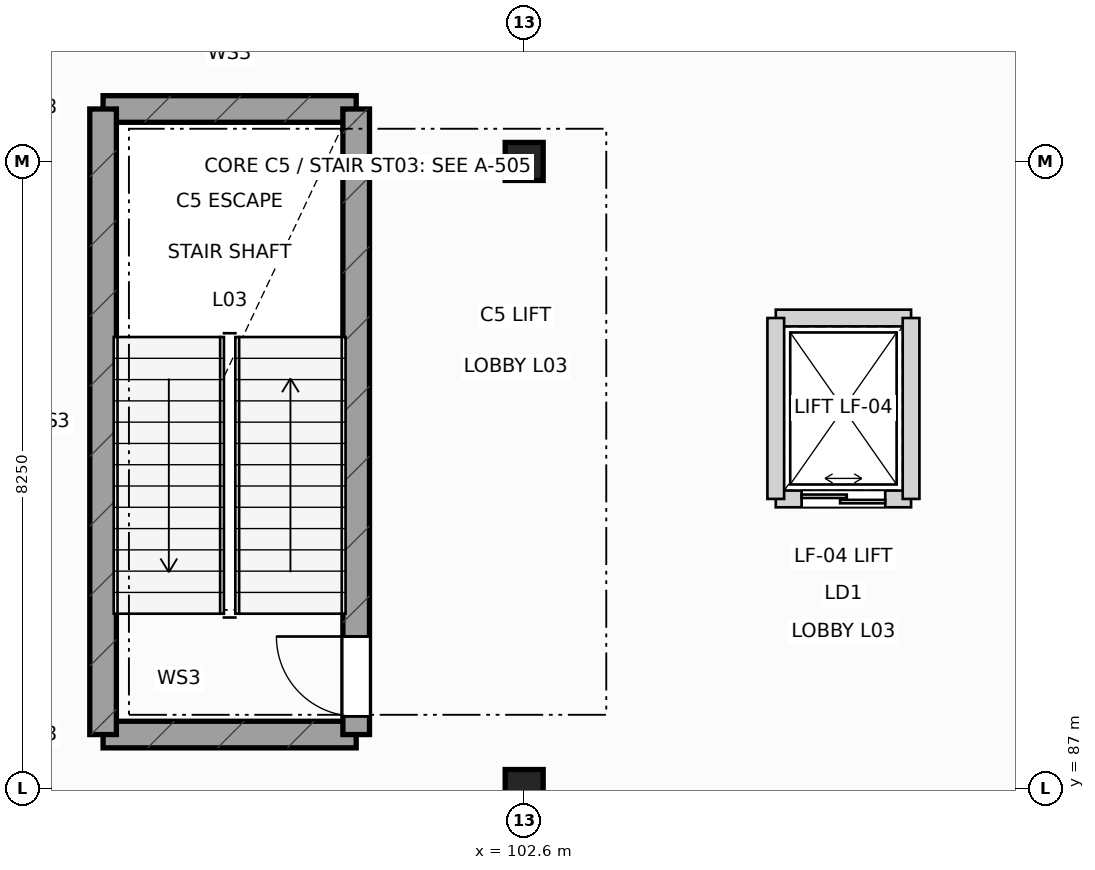
"""IFC4 building model, lengths in metres.
Left out: names, types, materials, properties, quantities, classifications, styles, units other than length and angle.
Written with IfcOpenShell. Run it as: python <this file> out.ifc"""

import sys

from ifc_helpers import new_model, si_unit, direction, frame, frame_2d, origin, origin_2d, place, context, subcontext, project, spatial, rectangle, extrude, element, fill, save


model = new_model("IFC4")
c1 = context("Model", 3, precision=1e-05, world=origin(), true_north=direction((0.0, 1.0)))
c2 = subcontext(c1, "Body", "Model", "MODEL_VIEW")
j1 = project(units=[si_unit("LENGTHUNIT", "METRE"), si_unit("PLANEANGLEUNIT", "RADIAN")], contexts=[c1])
p1 = place(None, origin())
s1 = spatial("IfcSite", under=j1, at=p1, CompositionType="ELEMENT")
p2 = place(p1, origin())
s2 = spatial("IfcBuilding", under=s1, at=p2, CompositionType="ELEMENT")
p3 = place(p2, frame((0.0, 0.0, 16.8)))
s3 = spatial("IfcBuildingStorey", under=s2, at=p3, CompositionType="ELEMENT", Elevation=16.8)
for number, where, z_axis, x_axis in (
    (1, (102.6, 87.0, 0.0), (0.0, 0.0, 1.0), (1.0, 0.0, 0.0)),
    (2, (102.6, 95.25, 0.0), (0.0, 0.0, 1.0), (1.0, 0.0, 0.0)),
):
    element("IfcColumn", number, at=place(p3, frame(where, z_axis=z_axis, x_axis=x_axis)), inside=s3, PredefinedType="COLUMN", context=c2, shape_type="SweptSolid", body=[
        extrude(rectangle(XDim=0.5, YDim=0.5, at=origin_2d()), origin(), (0.0, 0.0, 1.0), 4.8),
    ])
for number, where, z_axis, x_axis in (
    (3, (97.06, 87.71, 0.0), (0.0, 0.0, 1.0), (1.0, 0.0, 0.0)),
    (4, (97.06, 95.94, 0.0), (0.0, 0.0, 1.0), (1.0, 0.0, 0.0)),
):
    element("IfcWall", number, at=place(p3, frame(where, z_axis=z_axis, x_axis=x_axis)), inside=s3, PredefinedType="SHEAR", context=c2, shape_type="SweptSolid", body=[
        extrude(rectangle(XDim=3.33, YDim=0.35, at=frame_2d((1.665, 0.0))), origin(), (0.0, 0.0, 1.0), 4.52),
    ])
p4 = place(p3, frame((97.06, 87.71, 0.0), z_axis=(0.0, 0.0, 1.0), x_axis=(0.0, 1.0, 0.0)))
e5 = element("IfcWall", 5, at=p4, inside=s3, PredefinedType="SHEAR", context=c2, shape_type="SweptSolid", body=[
    extrude(rectangle(XDim=8.23, YDim=0.35, at=frame_2d((4.115, 0.0))), origin(), (0.0, 0.0, 1.0), 4.52),
])
p5 = place(p3, frame((100.39, 87.71, 0.0), z_axis=(0.0, 0.0, 1.0), x_axis=(0.0, 1.0, 0.0)))
e6 = element("IfcWall", 6, at=p5, inside=s3, PredefinedType="SHEAR", context=c2, shape_type="SweptSolid", body=[
    extrude(rectangle(XDim=8.23, YDim=0.35, at=frame_2d((4.115, 0.0))), origin(), (0.0, 0.0, 1.0), 4.52),
])
p6 = place(p5, frame((0.24, 0.0, 0.0)))
e7 = element("IfcOpeningElement", 7, at=p6, cuts=e6, PredefinedType="OPENING", context=c2, shape_type="SweptSolid", body=[
    extrude(rectangle(XDim=1.05, YDim=2.18, at=frame_2d((0.525, 1.09))), frame((0.0, 0.185, 0.0), z_axis=(0.0, -1.0, 0.0), x_axis=(1.0, 0.0, 0.0)), (0.0, 0.0, 1.0), 0.37),
])
p7 = place(p3, frame((105.91, 90.81, 0.0), z_axis=(0.0, 0.0, 1.0), x_axis=(1.0, 0.0, 0.0)))
e8 = element("IfcWall", 8, at=p7, inside=s3, PredefinedType="PARTITIONING", context=c2, shape_type="SweptSolid", body=[
    extrude(rectangle(XDim=1.78, YDim=0.22, at=frame_2d((0.89, 0.0))), origin(), (0.0, 0.0, 1.0), 4.485),
])
p8 = place(p7, frame((0.34, 0.0, 0.0)))
e9 = element("IfcOpeningElement", 9, at=p8, cuts=e8, PredefinedType="OPENING", context=c2, shape_type="SweptSolid", body=[
    extrude(rectangle(XDim=1.1, YDim=2.18, at=frame_2d((0.55, 1.09))), frame((0.0, 0.12, 0.0), z_axis=(0.0, -1.0, 0.0), x_axis=(1.0, 0.0, 0.0)), (0.0, 0.0, 1.0), 0.24),
])
p9 = place(p3, frame((105.91, 93.19, 0.0), z_axis=(0.0, 0.0, 1.0), x_axis=(1.0, 0.0, 0.0)))
e10 = element("IfcWall", 10, at=p9, inside=s3, PredefinedType="PARTITIONING", context=c2, shape_type="SweptSolid", body=[
    extrude(rectangle(XDim=1.78, YDim=0.22, at=frame_2d((0.89, 0.0))), origin(), (0.0, 0.0, 1.0), 4.485),
])
for number, where, z_axis, x_axis in (
    (11, (105.91, 90.81, 0.0), (0.0, 0.0, 1.0), (0.0, 1.0, 0.0)),
    (12, (107.69, 90.81, 0.0), (0.0, 0.0, 1.0), (0.0, 1.0, 0.0)),
):
    element("IfcWall", number, at=place(p3, frame(where, z_axis=z_axis, x_axis=x_axis)), inside=s3, PredefinedType="PARTITIONING", context=c2, shape_type="SweptSolid", body=[
        extrude(rectangle(XDim=2.38, YDim=0.22, at=frame_2d((1.19, 0.0))), origin(), (0.0, 0.0, 1.0), 4.485),
    ])
p10 = place(p6, origin())
e13 = element("IfcDoor", 13, at=p10, inside=s3, OperationType="SINGLE_SWING_RIGHT", PredefinedType="DOOR", context=c2, shape_type="SweptSolid", body=[
    extrude(rectangle(XDim=1.05, YDim=2.18, at=frame_2d((0.525, 1.09))), frame((0.0, 0.025, 0.0), z_axis=(0.0, -1.0, 0.0), x_axis=(1.0, 0.0, 0.0)), (0.0, 0.0, 1.0), 0.05),
])
fill(e7, e13)
p11 = place(p8, origin())
e14 = element("IfcDoor", 14, at=p11, inside=s3, OperationType="DOUBLE_DOOR_SLIDING", PredefinedType="DOOR", context=c2, shape_type="SweptSolid", body=[
    extrude(rectangle(XDim=1.1, YDim=2.18, at=frame_2d((0.55, 1.09))), frame((0.0, 0.025, 0.0), z_axis=(0.0, -1.0, 0.0), x_axis=(1.0, 0.0, 0.0)), (0.0, 0.0, 1.0), 0.05),
])
fill(e9, e14)
save(model, sys.argv[1])
